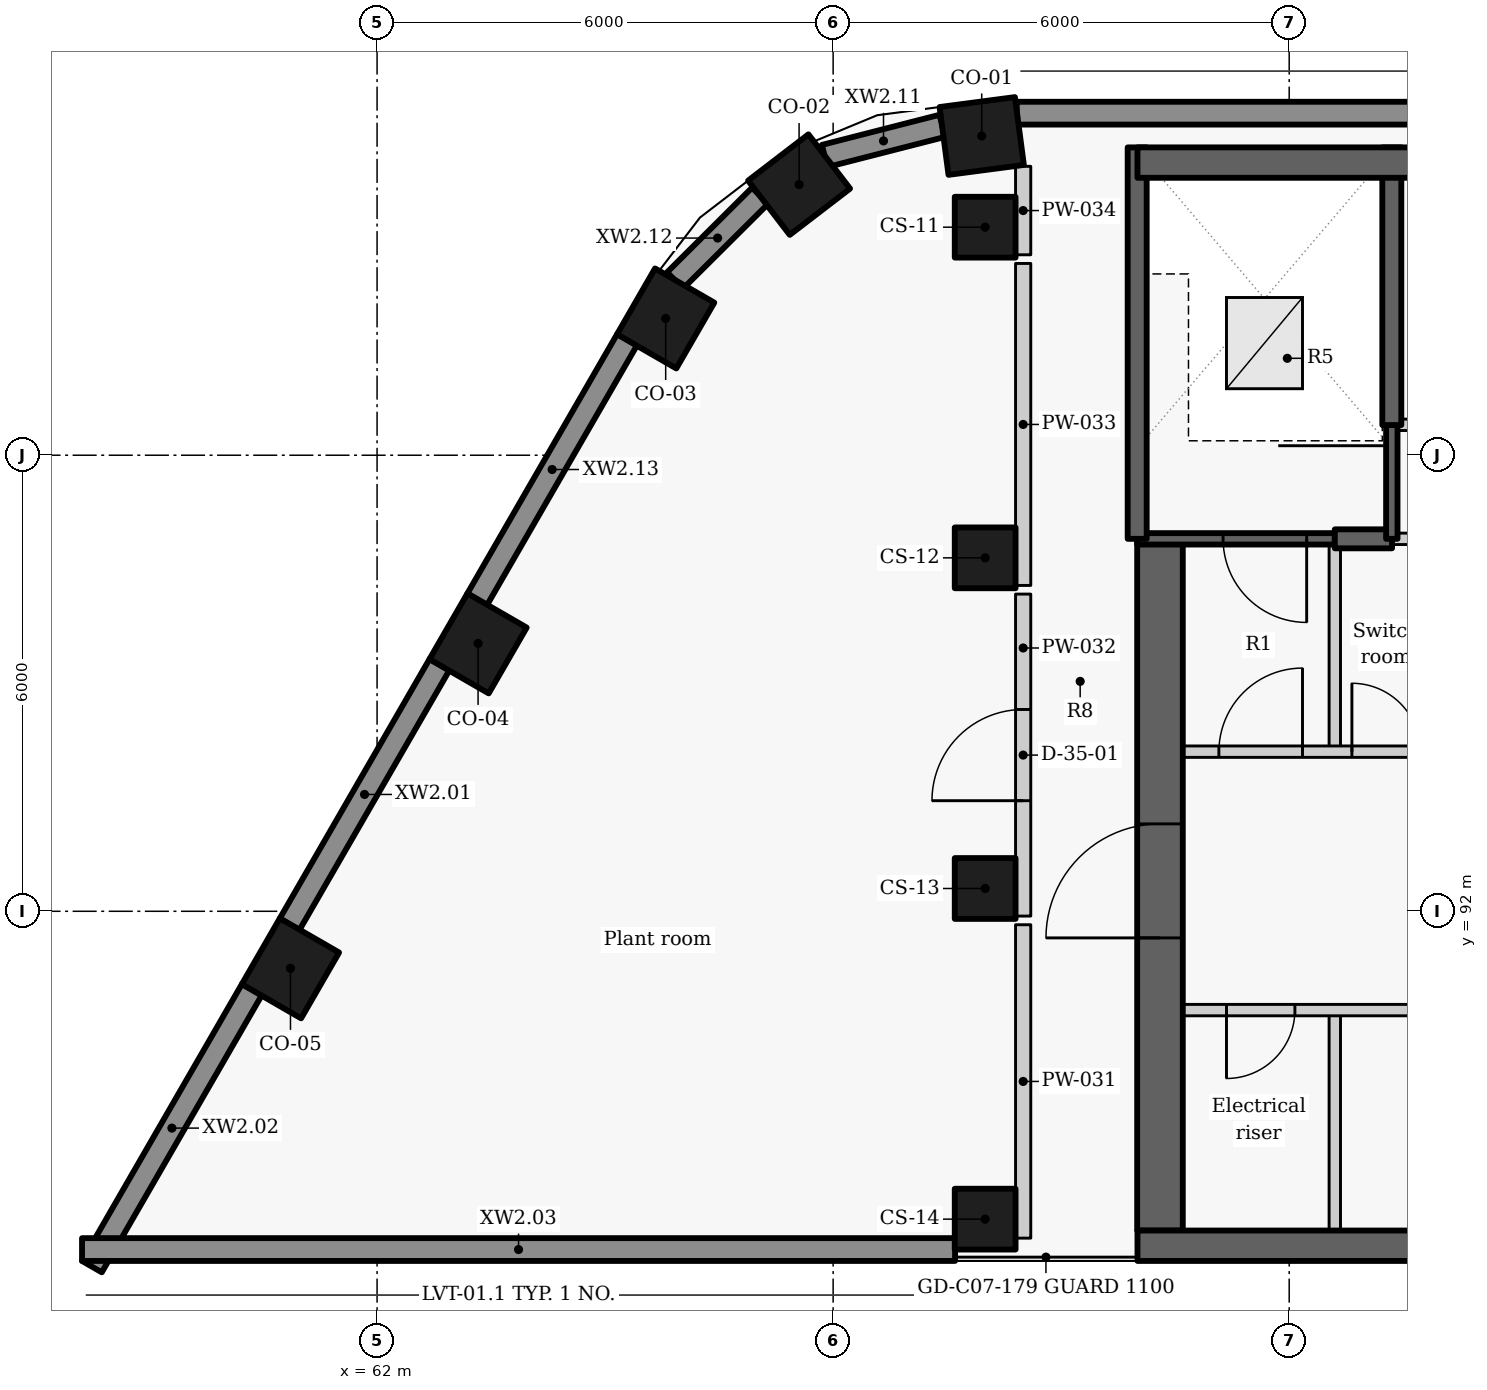
"""IFC4 building model, lengths in metres.
Left out: names, types, materials, properties, quantities, classifications, styles, units other than length and angle.
Written with IfcOpenShell. Run it as: python <this file> out.ifc"""

import sys

from ifc_helpers import new_model, si_unit, direction, frame, frame_2d, origin, origin_2d, place, context, subcontext, project, spatial, rectangle, extrude, element, fill, save


model = new_model("IFC4")
c1 = context("Model", 3, precision=1e-05, world=origin(), true_north=direction((0.0, 1.0)))
c2 = subcontext(c1, "Body", "Model", "MODEL_VIEW")
j1 = project(units=[si_unit("LENGTHUNIT", "METRE"), si_unit("PLANEANGLEUNIT", "RADIAN")], contexts=[c1])
p1 = place(None, origin())
s1 = spatial("IfcSite", under=j1, at=p1, CompositionType="ELEMENT")
p2 = place(p1, origin())
s2 = spatial("IfcBuilding", under=s1, at=p2, CompositionType="ELEMENT")
p3 = place(p2, frame((0.0, 0.0, 294.0)))
s3 = spatial("IfcBuildingStorey", under=s2, at=p3, CompositionType="ELEMENT", Elevation=294.0)
for number, where, z_axis, x_axis in (
    (1, (69.955, 102.2, 0.0), (0.0, 0.0, 1.0), (-0.991, -0.131, 0.0)),
    (2, (67.552, 101.56, 0.0), (0.0, 0.0, 1.0), (-0.793, -0.609, 0.0)),
    (3, (65.797, 99.8, 0.0), (0.0, 0.0, 1.0), (-0.5, -0.866, 0.0)),
    (4, (63.329, 95.525, 0.0), (0.0, 0.0, 1.0), (-0.5, -0.866, 0.0)),
    (5, (60.861, 91.25, 0.0), (0.0, 0.0, 1.0), (-0.5, -0.866, 0.0)),
):
    element("IfcColumn", number, at=place(p3, frame(where, z_axis=z_axis, x_axis=x_axis)), inside=s3, PredefinedType="COLUMN", context=c2, shape_type="SweptSolid", body=[
        extrude(rectangle(XDim=1.0, YDim=0.9, at=origin_2d()), origin(), (0.0, 0.0, 1.0), 3.6),
    ])
for number, where, z_axis, x_axis in (
    (6, (70.0, 101.0, 0.0), (0.0, 0.0, 1.0), (0.0, -1.0, 0.0)),
    (7, (70.0, 96.65, 0.0), (0.0, 0.0, 1.0), (0.0, -1.0, 0.0)),
    (8, (70.0, 92.3, 0.0), (0.0, 0.0, 1.0), (0.0, -1.0, 0.0)),
    (9, (70.0, 87.95, 0.0), (0.0, 0.0, 1.0), (0.0, -1.0, 0.0)),
):
    element("IfcColumn", number, at=place(p3, frame(where, z_axis=z_axis, x_axis=x_axis)), inside=s3, PredefinedType="COLUMN", context=c2, shape_type="SweptSolid", body=[
        extrude(rectangle(XDim=0.8, YDim=0.8, at=origin_2d()), origin(), (0.0, 0.0, 1.0), 3.6),
    ])
p4 = place(p3, frame((62.821, 95.245, 0.0), z_axis=(0.0, 0.0, 1.0), x_axis=(-0.499986771468, -0.866033041146, 0.0)))
e10 = element("IfcWall", 10, at=p4, inside=s3, PredefinedType="SOLIDWALL", context=c2, shape_type="SweptSolid", body=[
    extrude(rectangle(XDim=3.944, YDim=0.3, at=frame_2d((1.972, 0.0))), origin(), (0.0, 0.0, 1.0), 3.325),
])
p5 = place(p3, frame((60.353, 90.97, 0.0), z_axis=(0.0, 0.0, 1.0), x_axis=(-0.499981865284, -0.866035873614, 0.0)))
e11 = element("IfcWall", 11, at=p5, inside=s3, PredefinedType="SOLIDWALL", context=c2, shape_type="SweptSolid", body=[
    extrude(rectangle(XDim=4.209, YDim=0.3, at=frame_2d((2.104, 0.0))), origin(), (0.0, 0.0, 1.0), 3.325),
])
p6 = place(p3, frame((58.118, 87.55, 0.0), z_axis=(0.0, 0.0, 1.0), x_axis=(1.0, 0.0, 0.0)))
e12 = element("IfcWall", 12, at=p6, inside=s3, PredefinedType="SOLIDWALL", context=c2, shape_type="SweptSolid", body=[
    extrude(rectangle(XDim=11.486, YDim=0.3, at=frame_2d((5.743, 0.0))), origin(), (0.0, 0.0, 1.0), 3.325),
])
p7 = place(p3, frame((89.549, 102.5, 0.0), z_axis=(0.0, 0.0, 1.0), x_axis=(-1.0, 0.0, 0.0)))
e13 = element("IfcWall", 13, at=p7, inside=s3, PredefinedType="SOLIDWALL", context=c2, shape_type="SweptSolid", body=[
    extrude(rectangle(XDim=19.134, YDim=0.3, at=frame_2d((9.567, 0.0))), origin(), (0.0, 0.0, 1.0), 3.325),
])
p8 = place(p3, frame((69.437, 102.333, 0.0), z_axis=(0.0, 0.0, 1.0), x_axis=(-0.968770279168, -0.247959968947, 0.0)))
e14 = element("IfcWall", 14, at=p8, inside=s3, PredefinedType="SOLIDWALL", context=c2, shape_type="SweptSolid", body=[
    extrude(rectangle(XDim=1.598, YDim=0.3, at=frame_2d((0.799, 0.0))), origin(), (0.0, 0.0, 1.0), 3.325),
])
p9 = place(p3, frame((67.039, 101.414, 0.0), z_axis=(0.0, 0.0, 1.0), x_axis=(-0.708575326337, -0.705635179754, 0.0)))
e15 = element("IfcWall", 15, at=p9, inside=s3, PredefinedType="SOLIDWALL", context=c2, shape_type="SweptSolid", body=[
    extrude(rectangle(XDim=1.578, YDim=0.3, at=frame_2d((0.789, 0.0))), origin(), (0.0, 0.0, 1.0), 3.325),
])
p10 = place(p3, frame((65.289, 99.52, 0.0), z_axis=(0.0, 0.0, 1.0), x_axis=(-0.499986771468, -0.866033041146, 0.0)))
e16 = element("IfcWall", 16, at=p10, inside=s3, PredefinedType="SOLIDWALL", context=c2, shape_type="SweptSolid", body=[
    extrude(rectangle(XDim=3.944, YDim=0.3, at=frame_2d((1.972, 0.0))), origin(), (0.0, 0.0, 1.0), 3.325),
])
p11 = place(p3, frame((74.6, 87.8, 0.0), z_axis=(0.0, 0.0, 1.0), x_axis=(0.0, 1.0, 0.0)))
e17 = element("IfcWall", 17, at=p11, inside=s3, PredefinedType="PARTITIONING", context=c2, shape_type="SweptSolid", body=[
    extrude(rectangle(XDim=2.9, YDim=0.15, at=frame_2d((1.45, 0.0))), origin(), (0.0, 0.0, 1.0), 3.325),
])
p12 = place(p3, frame((74.6, 94.1, 0.0), z_axis=(0.0, 0.0, 1.0), x_axis=(0.0, 1.0, 0.0)))
e18 = element("IfcWall", 18, at=p12, inside=s3, PredefinedType="PARTITIONING", context=c2, shape_type="SweptSolid", body=[
    extrude(rectangle(XDim=2.8, YDim=0.15, at=frame_2d((1.4, 0.0))), origin(), (0.0, 0.0, 1.0), 3.325),
])
p13 = place(p3, frame((85.4, 90.7, 0.0), z_axis=(0.0, 0.0, 1.0), x_axis=(-1.0, 0.0, 0.0)))
e19 = element("IfcWall", 19, at=p13, inside=s3, PredefinedType="PARTITIONING", context=c2, shape_type="SweptSolid", body=[
    extrude(rectangle(XDim=13.4, YDim=0.15, at=frame_2d((6.7, 0.0))), origin(), (0.0, 0.0, 1.0), 3.325),
])
p14 = place(p13, frame((11.325, 0.0, 0.0)))
e20 = element("IfcOpeningElement", 20, at=p14, cuts=e19, PredefinedType="OPENING", context=c2, shape_type="SweptSolid", body=[
    extrude(rectangle(XDim=0.9, YDim=2.1, at=frame_2d((0.45, 1.05))), frame((0.0, 0.085, 0.0), z_axis=(0.0, -1.0, 0.0), x_axis=(1.0, 0.0, 0.0)), (0.0, 0.0, 1.0), 0.17),
])
p15 = place(p13, frame((4.95, 0.0, 0.0)))
e21 = element("IfcOpeningElement", 21, at=p15, cuts=e19, PredefinedType="OPENING", context=c2, shape_type="SweptSolid", body=[
    extrude(rectangle(XDim=0.9, YDim=2.1, at=frame_2d((0.45, 1.05))), frame((0.0, 0.085, 0.0), z_axis=(0.0, -1.0, 0.0), x_axis=(1.0, 0.0, 0.0)), (0.0, 0.0, 1.0), 0.17),
])
p16 = place(p3, frame((72.3, 87.8, -0.275), z_axis=(0.0, 0.0, 1.0), x_axis=(0.0, 1.0, 0.0)))
e22 = element("IfcWall", 22, at=p16, inside=s3, PredefinedType="SHEAR", context=c2, shape_type="SweptSolid", body=[
    extrude(rectangle(XDim=9.1, YDim=0.6, at=frame_2d((4.55, 0.0))), origin(), (0.0, 0.0, 1.0), 3.6),
])
p17 = place(p16, frame((3.85, 0.0, 0.275)))
e23 = element("IfcOpeningElement", 23, at=p17, cuts=e22, PredefinedType="OPENING", context=c2, shape_type="SweptSolid", body=[
    extrude(rectangle(XDim=1.5, YDim=2.1, at=frame_2d((0.75, 1.05))), frame((0.0, 0.31, 0.0), z_axis=(0.0, -1.0, 0.0), x_axis=(1.0, 0.0, 0.0)), (0.0, 0.0, 1.0), 0.62),
])
p18 = place(p3, frame((72.0, 94.1, 0.0), z_axis=(0.0, 0.0, 1.0), x_axis=(1.0, 0.0, 0.0)))
e24 = element("IfcWall", 24, at=p18, inside=s3, PredefinedType="PARTITIONING", context=c2, shape_type="SweptSolid", body=[
    extrude(rectangle(XDim=10.703, YDim=0.15, at=frame_2d((5.352, 0.0))), origin(), (0.0, 0.0, 1.0), 3.325),
])
p19 = place(p18, frame((1.075, 0.0, 0.0)))
e25 = element("IfcOpeningElement", 25, at=p19, cuts=e24, PredefinedType="OPENING", context=c2, shape_type="SweptSolid", body=[
    extrude(rectangle(XDim=1.1, YDim=2.1, at=frame_2d((0.55, 1.05))), frame((0.0, 0.085, 0.0), z_axis=(0.0, -1.0, 0.0), x_axis=(1.0, 0.0, 0.0)), (0.0, 0.0, 1.0), 0.17),
])
p20 = place(p18, frame((2.825, 0.0, 0.0)))
e26 = element("IfcOpeningElement", 26, at=p20, cuts=e24, PredefinedType="OPENING", context=c2, shape_type="SweptSolid", body=[
    extrude(rectangle(XDim=0.9, YDim=2.1, at=frame_2d((0.45, 1.05))), frame((0.0, 0.085, 0.0), z_axis=(0.0, -1.0, 0.0), x_axis=(1.0, 0.0, 0.0)), (0.0, 0.0, 1.0), 0.17),
])
p21 = place(p18, frame((4.175, 0.0, 0.0)))
e27 = element("IfcOpeningElement", 27, at=p21, cuts=e24, PredefinedType="OPENING", context=c2, shape_type="SweptSolid", body=[
    extrude(rectangle(XDim=0.9, YDim=2.1, at=frame_2d((0.45, 1.05))), frame((0.0, 0.085, 0.0), z_axis=(0.0, -1.0, 0.0), x_axis=(1.0, 0.0, 0.0)), (0.0, 0.0, 1.0), 0.17),
])
p22 = place(p18, frame((6.05, 0.0, 0.0)))
e28 = element("IfcOpeningElement", 28, at=p22, cuts=e24, PredefinedType="OPENING", context=c2, shape_type="SweptSolid", body=[
    extrude(rectangle(XDim=1.2, YDim=2.1, at=frame_2d((0.6, 1.05))), frame((0.0, 0.085, 0.0), z_axis=(0.0, -1.0, 0.0), x_axis=(1.0, 0.0, 0.0)), (0.0, 0.0, 1.0), 0.17),
])
p23 = place(p18, frame((8.225, 0.0, 0.0)))
e29 = element("IfcOpeningElement", 29, at=p23, cuts=e24, PredefinedType="OPENING", context=c2, shape_type="SweptSolid", body=[
    extrude(rectangle(XDim=0.9, YDim=2.1, at=frame_2d((0.45, 1.05))), frame((0.0, 0.085, 0.0), z_axis=(0.0, -1.0, 0.0), x_axis=(1.0, 0.0, 0.0)), (0.0, 0.0, 1.0), 0.17),
])
p24 = place(p18, frame((9.575, 0.0, 0.0)))
e30 = element("IfcOpeningElement", 30, at=p24, cuts=e24, PredefinedType="OPENING", context=c2, shape_type="SweptSolid", body=[
    extrude(rectangle(XDim=0.9, YDim=2.1, at=frame_2d((0.45, 1.05))), frame((0.0, 0.085, 0.0), z_axis=(0.0, -1.0, 0.0), x_axis=(1.0, 0.0, 0.0)), (0.0, 0.0, 1.0), 0.17),
])
p25 = place(p3, frame((74.6, 96.9, -0.275), z_axis=(0.0, 0.0, 1.0), x_axis=(-1.0, 0.0, 0.0)))
e31 = element("IfcWall", 31, at=p25, inside=s3, PredefinedType="SHEAR", context=c2, shape_type="SweptSolid", body=[
    extrude(rectangle(XDim=2.6, YDim=0.15, at=frame_2d((1.3, 0.0))), origin(), (0.0, 0.0, 1.0), 3.6),
])
p26 = place(p25, frame((0.37, 0.0, 0.275)))
e32 = element("IfcOpeningElement", 32, at=p26, cuts=e31, PredefinedType="OPENING", context=c2, shape_type="SweptSolid", body=[
    extrude(rectangle(XDim=1.1, YDim=2.1, at=frame_2d((0.55, 1.05))), frame((0.0, 0.085, 0.0), z_axis=(0.0, -1.0, 0.0), x_axis=(1.0, 0.0, 0.0)), (0.0, 0.0, 1.0), 0.17),
])
p27 = place(p3, frame((74.6, 96.9, -0.275), z_axis=(0.0, 0.0, 1.0), x_axis=(1.0, 0.0, 0.0)))
e33 = element("IfcWall", 33, at=p27, inside=s3, PredefinedType="SHEAR", context=c2, shape_type="SweptSolid", body=[
    extrude(rectangle(XDim=0.753, YDim=0.25, at=frame_2d((0.376, 0.0))), origin(), (0.0, 0.0, 1.0), 3.6),
])
p28 = place(p3, frame((75.347, 96.9, 0.0), z_axis=(0.0, 0.0, 1.0), x_axis=(1.0, 0.0, 0.0)))
e34 = element("IfcWall", 34, at=p28, inside=s3, PredefinedType="PARTITIONING", context=c2, shape_type="SweptSolid", body=[
    extrude(rectangle(XDim=5.206, YDim=0.15, at=frame_2d((2.603, 0.0))), origin(), (0.0, 0.0, 1.0), 3.325),
])
p29 = place(p28, frame((2.803, 0.0, 0.0)))
e35 = element("IfcOpeningElement", 35, at=p29, cuts=e34, PredefinedType="OPENING", context=c2, shape_type="SweptSolid", body=[
    extrude(rectangle(XDim=1.0, YDim=2.1, at=frame_2d((0.5, 1.05))), frame((0.0, 0.085, 0.0), z_axis=(0.0, -1.0, 0.0), x_axis=(1.0, 0.0, 0.0)), (0.0, 0.0, 1.0), 0.17),
])
p30 = place(p3, frame((75.35, 96.9, -0.275), z_axis=(0.0, 0.0, 1.0), x_axis=(0.0, 1.0, 0.0)))
e36 = element("IfcWall", 36, at=p30, inside=s3, PredefinedType="SHEAR", context=c2, shape_type="SweptSolid", body=[
    extrude(rectangle(XDim=1.503, YDim=0.15, at=frame_2d((0.751, 0.0))), origin(), (0.0, 0.0, 1.0), 3.6),
])
p31 = place(p3, frame((75.35, 98.397, -0.275), z_axis=(0.0, 0.0, 1.0), x_axis=(0.0, 1.0, 0.0)))
e37 = element("IfcWall", 37, at=p31, inside=s3, PredefinedType="SHEAR", context=c2, shape_type="SweptSolid", body=[
    extrude(rectangle(XDim=3.653, YDim=0.25, at=frame_2d((1.827, 0.0))), origin(), (0.0, 0.0, 1.0), 3.6),
])
p32 = place(p3, frame((72.0, 96.9, -0.275), z_axis=(0.0, 0.0, 1.0), x_axis=(0.0, 1.0, 0.0)))
e38 = element("IfcWall", 38, at=p32, inside=s3, PredefinedType="SHEAR", context=c2, shape_type="SweptSolid", body=[
    extrude(rectangle(XDim=5.15, YDim=0.25, at=frame_2d((2.575, 0.0))), origin(), (0.0, 0.0, 1.0), 3.6),
])
p33 = place(p3, frame((75.35, 98.4, 0.0), z_axis=(0.0, 0.0, 1.0), x_axis=(1.0, 0.0, 0.0)))
e39 = element("IfcWall", 39, at=p33, inside=s3, PredefinedType="PARTITIONING", context=c2, shape_type="SweptSolid", body=[
    extrude(rectangle(XDim=5.2, YDim=0.15, at=frame_2d((2.6, 0.0))), origin(), (0.0, 0.0, 1.0), 3.325),
])
p34 = place(p33, frame((0.59, 0.0, 0.0)))
e40 = element("IfcOpeningElement", 40, at=p34, cuts=e39, PredefinedType="OPENING", context=c2, shape_type="SweptSolid", body=[
    extrude(rectangle(XDim=0.9, YDim=2.1, at=frame_2d((0.45, 1.05))), frame((0.0, 0.085, 0.0), z_axis=(0.0, -1.0, 0.0), x_axis=(1.0, 0.0, 0.0)), (0.0, 0.0, 1.0), 0.17),
])
p35 = place(p33, frame((3.19, 0.0, 0.0)))
e41 = element("IfcOpeningElement", 41, at=p35, cuts=e39, PredefinedType="OPENING", context=c2, shape_type="SweptSolid", body=[
    extrude(rectangle(XDim=0.9, YDim=2.1, at=frame_2d((0.45, 1.05))), frame((0.0, 0.085, 0.0), z_axis=(0.0, -1.0, 0.0), x_axis=(1.0, 0.0, 0.0)), (0.0, 0.0, 1.0), 0.17),
])
p36 = place(p3, frame((70.5, 87.7, 0.0), z_axis=(0.0, 0.0, 1.0), x_axis=(0.0, 1.0, 0.0)))
e42 = element("IfcWall", 42, at=p36, inside=s3, PredefinedType="PARTITIONING", context=c2, shape_type="SweptSolid", body=[
    extrude(rectangle(XDim=4.123, YDim=0.2, at=frame_2d((2.062, 0.0))), origin(), (0.0, 0.0, 1.0), 3.325),
])
p37 = place(p3, frame((70.5, 91.937, 0.0), z_axis=(0.0, 0.0, 1.0), x_axis=(0.0, 1.0, 0.0)))
e43 = element("IfcWall", 43, at=p37, inside=s3, PredefinedType="PARTITIONING", context=c2, shape_type="SweptSolid", body=[
    extrude(rectangle(XDim=4.236, YDim=0.2, at=frame_2d((2.118, 0.0))), origin(), (0.0, 0.0, 1.0), 3.325),
])
p38 = place(p37, frame((1.518, 0.0, 0.0)))
e44 = element("IfcOpeningElement", 44, at=p38, cuts=e43, PredefinedType="OPENING", context=c2, shape_type="SweptSolid", body=[
    extrude(rectangle(XDim=1.2, YDim=2.1, at=frame_2d((0.6, 1.05))), frame((0.0, 0.11, 0.0), z_axis=(0.0, -1.0, 0.0), x_axis=(1.0, 0.0, 0.0)), (0.0, 0.0, 1.0), 0.22),
])
p39 = place(p3, frame((70.5, 96.287, 0.0), z_axis=(0.0, 0.0, 1.0), x_axis=(0.0, 1.0, 0.0)))
e45 = element("IfcWall", 45, at=p39, inside=s3, PredefinedType="PARTITIONING", context=c2, shape_type="SweptSolid", body=[
    extrude(rectangle(XDim=4.236, YDim=0.2, at=frame_2d((2.118, 0.0))), origin(), (0.0, 0.0, 1.0), 3.325),
])
p40 = place(p3, frame((70.5, 100.637, 0.0), z_axis=(0.0, 0.0, 1.0), x_axis=(0.0, 1.0, 0.0)))
e46 = element("IfcWall", 46, at=p40, inside=s3, PredefinedType="PARTITIONING", context=c2, shape_type="SweptSolid", body=[
    extrude(rectangle(XDim=1.164, YDim=0.2, at=frame_2d((0.582, 0.0))), origin(), (0.0, 0.0, 1.0), 3.325),
])
p41 = place(p3, frame((72.004, 87.6, -0.275), z_axis=(0.0, 0.0, 1.0), x_axis=(1.0, 0.0, 0.0)))
e47 = element("IfcWall", 47, at=p41, inside=s3, PredefinedType="SHEAR", context=c2, shape_type="SweptSolid", body=[
    extrude(rectangle(XDim=13.396, YDim=0.4, at=frame_2d((6.698, 0.0))), origin(), (0.0, 0.0, 1.0), 3.6),
])
p42 = place(p3, frame((72.004, 101.85, -0.275), z_axis=(0.0, 0.0, 1.0), x_axis=(1.0, 0.0, 0.0)))
e48 = element("IfcWall", 48, at=p42, inside=s3, PredefinedType="SHEAR", context=c2, shape_type="SweptSolid", body=[
    extrude(rectangle(XDim=15.992, YDim=0.4, at=frame_2d((7.996, 0.0))), origin(), (0.0, 0.0, 1.0), 3.6),
])
p43 = place(p2, frame((0.0, 0.0, 297.6)))
p44 = place(p43, frame((0.0, 0.0, -0.275)))
p45 = place(p44, frame((73.675, 99.475, 0.0)))
p46 = place(p45, frame((0.0, 0.0, 0.225)))
e49 = element("IfcDoor", 49, at=p46, inside=s3, OperationType="SINGLE_SWING_LEFT", PredefinedType="TRAPDOOR", context=c2, shape_type="SweptSolid", body=[
    extrude(rectangle(XDim=1.0, YDim=1.2, at=origin_2d()), origin(), (0.0, 0.0, 1.0), 0.05),
])
p47 = place(p14, origin())
e50 = element("IfcDoor", 50, at=p47, inside=s3, OperationType="SINGLE_SWING_RIGHT", PredefinedType="DOOR", context=c2, shape_type="SweptSolid", body=[
    extrude(rectangle(XDim=0.9, YDim=2.1, at=frame_2d((0.45, 1.05))), frame((0.0, 0.025, 0.0), z_axis=(0.0, -1.0, 0.0), x_axis=(1.0, 0.0, 0.0)), (0.0, 0.0, 1.0), 0.05),
])
fill(e20, e50)
p48 = place(p19, origin())
e51 = element("IfcDoor", 51, at=p48, inside=s3, OperationType="SINGLE_SWING_RIGHT", PredefinedType="DOOR", context=c2, shape_type="SweptSolid", body=[
    extrude(rectangle(XDim=1.1, YDim=2.1, at=frame_2d((0.55, 1.05))), frame((0.0, 0.025, 0.0), z_axis=(0.0, -1.0, 0.0), x_axis=(1.0, 0.0, 0.0)), (0.0, 0.0, 1.0), 0.05),
])
fill(e25, e51)
p49 = place(p20, origin())
e52 = element("IfcDoor", 52, at=p49, inside=s3, OperationType="SINGLE_SWING_LEFT", PredefinedType="DOOR", context=c2, shape_type="SweptSolid", body=[
    extrude(rectangle(XDim=0.9, YDim=2.1, at=frame_2d((0.45, 1.05))), frame((0.0, 0.025, 0.0), z_axis=(0.0, -1.0, 0.0), x_axis=(1.0, 0.0, 0.0)), (0.0, 0.0, 1.0), 0.05),
])
fill(e26, e52)
p50 = place(p26, origin())
e53 = element("IfcDoor", 53, at=p50, inside=s3, OperationType="SINGLE_SWING_LEFT", PredefinedType="DOOR", context=c2, shape_type="SweptSolid", body=[
    extrude(rectangle(XDim=1.1, YDim=2.1, at=frame_2d((0.55, 1.05))), frame((0.0, 0.025, 0.0), z_axis=(0.0, -1.0, 0.0), x_axis=(1.0, 0.0, 0.0)), (0.0, 0.0, 1.0), 0.05),
])
fill(e32, e53)
p51 = place(p38, origin())
e54 = element("IfcDoor", 54, at=p51, inside=s3, OperationType="SINGLE_SWING_LEFT", PredefinedType="DOOR", context=c2, shape_type="SweptSolid", body=[
    extrude(rectangle(XDim=1.2, YDim=2.1, at=frame_2d((0.6, 1.05))), frame((0.0, 0.025, 0.0), z_axis=(0.0, -1.0, 0.0), x_axis=(1.0, 0.0, 0.0)), (0.0, 0.0, 1.0), 0.05),
])
fill(e44, e54)
p52 = place(p17, origin())
e55 = element("IfcDoor", 55, at=p52, inside=s3, OperationType="DOUBLE_DOOR_SINGLE_SWING", PredefinedType="DOOR", context=c2, shape_type="SweptSolid", body=[
    extrude(rectangle(XDim=1.5, YDim=2.1, at=frame_2d((0.75, 1.05))), frame((0.0, 0.025, 0.0), z_axis=(0.0, -1.0, 0.0), x_axis=(1.0, 0.0, 0.0)), (0.0, 0.0, 1.0), 0.05),
])
fill(e23, e55)
save(model, sys.argv[1])
